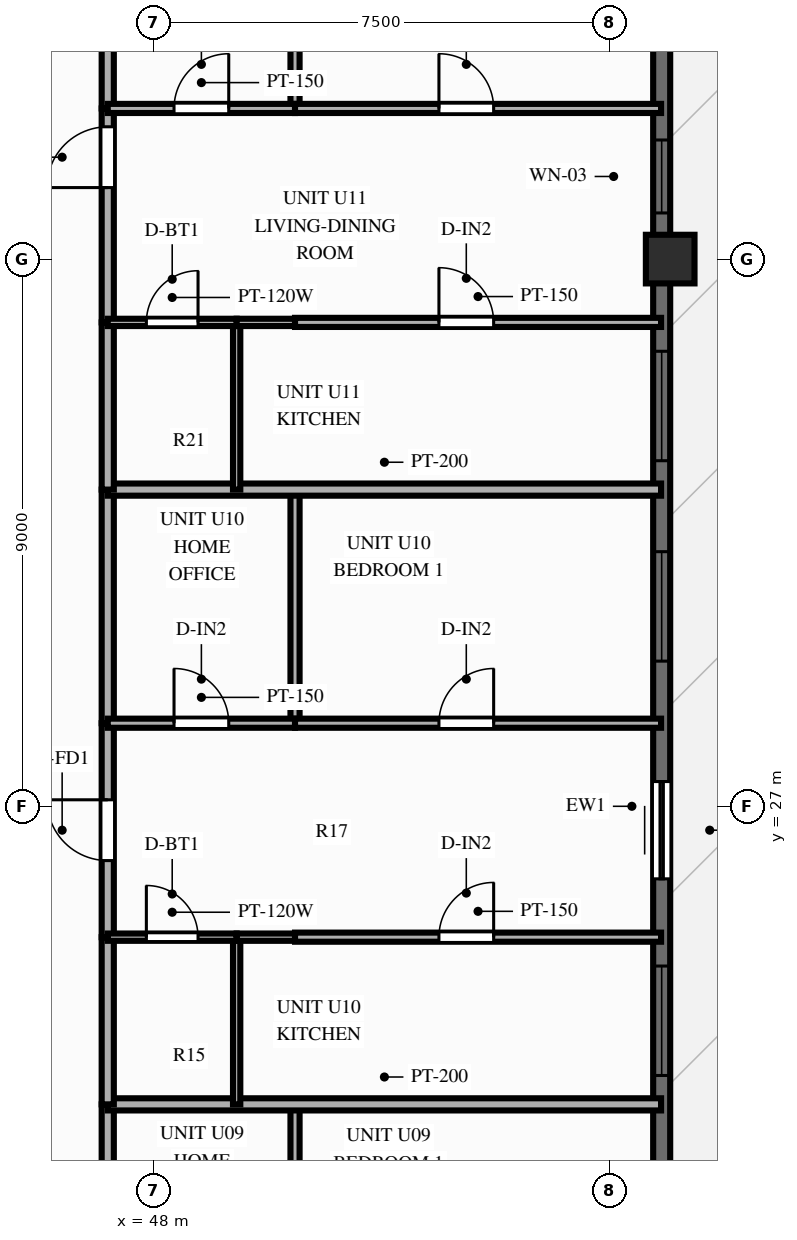
"""IFC4 building model, lengths in metres.
Left out: names, types, materials, properties, quantities, classifications, styles, units other than length and angle.
Written with IfcOpenShell. Run it as: python <this file> out.ifc"""

import sys

from ifc_helpers import new_model, si_unit, direction, frame, frame_2d, origin, origin_2d, place, context, subcontext, project, spatial, rectangle, extrude, source, transform, mapped, element, fill, save


model = new_model("IFC4")
c1 = context("Model", 3, precision=1e-05, world=origin(), true_north=direction((0.0, 1.0)))
c2 = subcontext(c1, "Body", "Model", "MODEL_VIEW")
j1 = project(units=[si_unit("LENGTHUNIT", "METRE"), si_unit("PLANEANGLEUNIT", "RADIAN")], contexts=[c1])
p1 = place(None, origin())
s1 = spatial("IfcSite", under=j1, at=p1, CompositionType="ELEMENT")
p2 = place(p1, origin())
s2 = spatial("IfcBuilding", under=s1, at=p2, CompositionType="ELEMENT")
p3 = place(p2, frame((0.0, 0.0, 202.6)))
s3 = spatial("IfcBuildingStorey", under=s2, at=p3, CompositionType="ELEMENT", Elevation=202.6)
m1 = source(origin(), c2, "Body", "SweptSolid", [
    extrude(rectangle(XDim=0.8, YDim=0.8, at=origin_2d()), origin(), (0.0, 0.0, 1.0), 3.9),
])
p4 = place(p3, frame((56.5, 36.0, 0.0), z_axis=(0.0, 0.0, 1.0), x_axis=(1.0, 0.0, 0.0)))
e1 = element("IfcColumn", 1, at=p4, inside=s3, PredefinedType="COLUMN", context=c2, shape_type="MappedRepresentation", body=[
    mapped(m1, transform((0.0, 0.0, 0.0), scale=1.0)),
])
p5 = place(p3, frame((56.36, 11.5, 0.0), z_axis=(0.0, 0.0, 1.0), x_axis=(0.0, 1.0, 0.0)))
e2 = element("IfcWall", 2, at=p5, inside=s3, PredefinedType="SOLIDWALL", context=c2, shape_type="SweptSolid", body=[
    extrude(rectangle(XDim=31.0, YDim=0.28, at=frame_2d((15.5, 0.0))), origin(), (0.0, 0.0, 1.0), 2.79),
])
p6 = place(p5, frame((0.685, 0.0, 0.85)))
e3 = element("IfcOpeningElement", 3, at=p6, cuts=e2, PredefinedType="OPENING", context=c2, shape_type="SweptSolid", body=[
    extrude(rectangle(XDim=1.8, YDim=1.65, at=frame_2d((0.9, 0.825))), frame((0.0, 0.152, 0.0), z_axis=(0.0, -1.0, 0.0), x_axis=(1.0, 0.0, 0.0)), (0.0, 0.0, 1.0), 0.304),
])
p7 = place(p5, frame((3.695, 0.0, 0.85)))
e4 = element("IfcOpeningElement", 4, at=p7, cuts=e2, PredefinedType="OPENING", context=c2, shape_type="SweptSolid", body=[
    extrude(rectangle(XDim=1.8, YDim=1.65, at=frame_2d((0.9, 0.825))), frame((0.0, 0.152, 0.0), z_axis=(0.0, -1.0, 0.0), x_axis=(1.0, 0.0, 0.0)), (0.0, 0.0, 1.0), 0.304),
])
p8 = place(p5, frame((7.789, 0.0, 0.85)))
e5 = element("IfcOpeningElement", 5, at=p8, cuts=e2, PredefinedType="OPENING", context=c2, shape_type="SweptSolid", body=[
    extrude(rectangle(XDim=1.8, YDim=1.65, at=frame_2d((0.9, 0.825))), frame((0.0, 0.152, 0.0), z_axis=(0.0, -1.0, 0.0), x_axis=(1.0, 0.0, 0.0)), (0.0, 0.0, 1.0), 0.304),
])
p9 = place(p5, frame((11.073, 0.0, 0.85)))
e6 = element("IfcOpeningElement", 6, at=p9, cuts=e2, PredefinedType="OPENING", context=c2, shape_type="SweptSolid", body=[
    extrude(rectangle(XDim=1.8, YDim=1.65, at=frame_2d((0.9, 0.825))), frame((0.0, 0.152, 0.0), z_axis=(0.0, -1.0, 0.0), x_axis=(1.0, 0.0, 0.0)), (0.0, 0.0, 1.0), 0.304),
])
p10 = place(p5, frame((15.907, 0.0, 0.0), z_axis=(0.0, 0.0, 1.0), x_axis=(-1.0, 0.0, 0.0)))
e7 = element("IfcOpeningElement", 7, at=p10, cuts=e2, PredefinedType="OPENING", context=c2, shape_type="SweptSolid", body=[
    extrude(rectangle(XDim=1.6, YDim=2.15, at=frame_2d((0.8, 1.075))), frame((0.0, 0.152, 0.0), z_axis=(0.0, -1.0, 0.0), x_axis=(1.0, 0.0, 0.0)), (0.0, 0.0, 1.0), 0.304),
])
p11 = place(p5, frame((17.888, 0.0, 0.85)))
e8 = element("IfcOpeningElement", 8, at=p11, cuts=e2, PredefinedType="OPENING", context=c2, shape_type="SweptSolid", body=[
    extrude(rectangle(XDim=1.8, YDim=1.65, at=frame_2d((0.9, 0.825))), frame((0.0, 0.152, 0.0), z_axis=(0.0, -1.0, 0.0), x_axis=(1.0, 0.0, 0.0)), (0.0, 0.0, 1.0), 0.304),
])
p12 = place(p5, frame((21.184, 0.0, 0.85)))
e9 = element("IfcOpeningElement", 9, at=p12, cuts=e2, PredefinedType="OPENING", context=c2, shape_type="SweptSolid", body=[
    extrude(rectangle(XDim=1.8, YDim=1.65, at=frame_2d((0.9, 0.825))), frame((0.0, 0.152, 0.0), z_axis=(0.0, -1.0, 0.0), x_axis=(1.0, 0.0, 0.0)), (0.0, 0.0, 1.0), 0.304),
])
p13 = place(p5, frame((25.259, 0.0, 0.85)))
e10 = element("IfcOpeningElement", 10, at=p13, cuts=e2, PredefinedType="OPENING", context=c2, shape_type="SweptSolid", body=[
    extrude(rectangle(XDim=1.2, YDim=1.5, at=frame_2d((0.6, 0.75))), frame((0.0, 0.152, 0.0), z_axis=(0.0, -1.0, 0.0), x_axis=(1.0, 0.0, 0.0)), (0.0, 0.0, 1.0), 0.304),
])
p14 = place(p5, frame((27.969, 0.0, 0.85)))
e11 = element("IfcOpeningElement", 11, at=p14, cuts=e2, PredefinedType="OPENING", context=c2, shape_type="SweptSolid", body=[
    extrude(rectangle(XDim=1.8, YDim=1.65, at=frame_2d((0.9, 0.825))), frame((0.0, 0.152, 0.0), z_axis=(0.0, -1.0, 0.0), x_axis=(1.0, 0.0, 0.0)), (0.0, 0.0, 1.0), 0.304),
])
p15 = place(p3, frame((47.25, 18.28, 0.0), z_axis=(0.0, 0.0, 1.0), x_axis=(0.0, 1.0, 0.0)))
e12 = element("IfcWall", 12, at=p15, inside=s3, PredefinedType="PARTITIONING", context=c2, shape_type="SweptSolid", body=[
    extrude(rectangle(XDim=3.818, YDim=0.2, at=frame_2d((1.909, 0.0))), origin(), (0.0, 0.0, 1.0), 3.6),
])
p16 = place(p3, frame((50.33, 18.28, 0.0), z_axis=(0.0, 0.0, 1.0), x_axis=(0.0, 1.0, 0.0)))
e13 = element("IfcWall", 13, at=p16, inside=s3, PredefinedType="PARTITIONING", context=c2, shape_type="SweptSolid", body=[
    extrude(rectangle(XDim=3.818, YDim=0.15, at=frame_2d((1.909, 0.0))), origin(), (0.0, 0.0, 1.0), 3.39),
])
p17 = place(p3, frame((47.25, 22.098, 0.0), z_axis=(0.0, 0.0, 1.0), x_axis=(1.0, 0.0, 0.0)))
e14 = element("IfcWall", 14, at=p17, inside=s3, PredefinedType="PARTITIONING", context=c2, shape_type="SweptSolid", body=[
    extrude(rectangle(XDim=9.1, YDim=0.2, at=frame_2d((4.55, 0.0))), origin(), (0.0, 0.0, 1.0), 3.29),
])
p18 = place(p3, frame((47.25, 22.098, 0.0), z_axis=(0.0, 0.0, 1.0), x_axis=(0.0, 1.0, 0.0)))
e15 = element("IfcWall", 15, at=p18, inside=s3, PredefinedType="PARTITIONING", context=c2, shape_type="SweptSolid", body=[
    extrude(rectangle(XDim=2.75, YDim=0.2, at=frame_2d((1.375, 0.0))), origin(), (0.0, 0.0, 1.0), 3.6),
])
p19 = place(p3, frame((47.25, 24.848, 0.0), z_axis=(0.0, 0.0, 1.0), x_axis=(0.0, 1.0, 0.0)))
e16 = element("IfcWall", 16, at=p19, inside=s3, PredefinedType="PARTITIONING", context=c2, shape_type="SweptSolid", body=[
    extrude(rectangle(XDim=3.519, YDim=0.2, at=frame_2d((1.759, 0.0))), origin(), (0.0, 0.0, 1.0), 3.6),
])
p20 = place(p19, frame((1.26, 0.0, 0.0)))
e17 = element("IfcOpeningElement", 17, at=p20, cuts=e16, PredefinedType="OPENING", context=c2, shape_type="SweptSolid", body=[
    extrude(rectangle(XDim=1.0, YDim=2.15, at=frame_2d((0.5, 1.075))), frame((0.0, 0.112, 0.0), z_axis=(0.0, -1.0, 0.0), x_axis=(1.0, 0.0, 0.0)), (0.0, 0.0, 1.0), 0.224),
])
p21 = place(p3, frame((47.25, 28.366, 0.0), z_axis=(0.0, 0.0, 1.0), x_axis=(0.0, 1.0, 0.0)))
e18 = element("IfcWall", 18, at=p21, inside=s3, PredefinedType="PARTITIONING", context=c2, shape_type="SweptSolid", body=[
    extrude(rectangle(XDim=3.842, YDim=0.2, at=frame_2d((1.921, 0.0))), origin(), (0.0, 0.0, 1.0), 3.6),
])
p22 = place(p3, frame((49.37, 22.098, 0.0), z_axis=(0.0, 0.0, 1.0), x_axis=(0.0, 1.0, 0.0)))
e19 = element("IfcWall", 19, at=p22, inside=s3, PredefinedType="PARTITIONING", context=c2, shape_type="SweptSolid", body=[
    extrude(rectangle(XDim=2.75, YDim=0.12, at=frame_2d((1.375, 0.0))), origin(), (0.0, 0.0, 1.0), 3.6),
])
p23 = place(p3, frame((50.33, 28.366, 0.0), z_axis=(0.0, 0.0, 1.0), x_axis=(0.0, 1.0, 0.0)))
e20 = element("IfcWall", 20, at=p23, inside=s3, PredefinedType="PARTITIONING", context=c2, shape_type="SweptSolid", body=[
    extrude(rectangle(XDim=3.842, YDim=0.15, at=frame_2d((1.921, 0.0))), origin(), (0.0, 0.0, 1.0), 3.39),
])
p24 = place(p3, frame((47.25, 24.848, 0.0), z_axis=(0.0, 0.0, 1.0), x_axis=(1.0, 0.0, 0.0)))
e21 = element("IfcWall", 21, at=p24, inside=s3, PredefinedType="PARTITIONING", context=c2, shape_type="SweptSolid", body=[
    extrude(rectangle(XDim=2.12, YDim=0.12, at=frame_2d((1.06, 0.0))), origin(), (0.0, 0.0, 1.0), 3.6),
])
p25 = place(p24, frame((0.635, 0.0, 0.0)))
e22 = element("IfcOpeningElement", 22, at=p25, cuts=e21, PredefinedType="OPENING", context=c2, shape_type="SweptSolid", body=[
    extrude(rectangle(XDim=0.85, YDim=2.05, at=frame_2d((0.425, 1.025))), frame((0.0, 0.072, 0.0), z_axis=(0.0, -1.0, 0.0), x_axis=(1.0, 0.0, 0.0)), (0.0, 0.0, 1.0), 0.144),
])
p26 = place(p3, frame((49.37, 24.848, 0.0), z_axis=(0.0, 0.0, 1.0), x_axis=(1.0, 0.0, 0.0)))
e23 = element("IfcWall", 23, at=p26, inside=s3, PredefinedType="PARTITIONING", context=c2, shape_type="SweptSolid", body=[
    extrude(rectangle(XDim=0.96, YDim=0.12, at=frame_2d((0.48, 0.0))), origin(), (0.0, 0.0, 1.0), 3.6),
])
p27 = place(p3, frame((50.33, 24.848, 0.0), z_axis=(0.0, 0.0, 1.0), x_axis=(1.0, 0.0, 0.0)))
e24 = element("IfcWall", 24, at=p27, inside=s3, PredefinedType="PARTITIONING", context=c2, shape_type="SweptSolid", body=[
    extrude(rectangle(XDim=6.02, YDim=0.15, at=frame_2d((3.01, 0.0))), origin(), (0.0, 0.0, 1.0), 3.6),
])
p28 = place(p27, frame((2.367, 0.0, 0.0)))
e25 = element("IfcOpeningElement", 25, at=p28, cuts=e24, PredefinedType="OPENING", context=c2, shape_type="SweptSolid", body=[
    extrude(rectangle(XDim=0.9, YDim=2.1, at=frame_2d((0.45, 1.05))), frame((0.0, 0.087, 0.0), z_axis=(0.0, -1.0, 0.0), x_axis=(1.0, 0.0, 0.0)), (0.0, 0.0, 1.0), 0.174),
])
p29 = place(p3, frame((47.25, 28.366, 0.0), z_axis=(0.0, 0.0, 1.0), x_axis=(1.0, 0.0, 0.0)))
e26 = element("IfcWall", 26, at=p29, inside=s3, PredefinedType="PARTITIONING", context=c2, shape_type="SweptSolid", body=[
    extrude(rectangle(XDim=3.08, YDim=0.15, at=frame_2d((1.54, 0.0))), origin(), (0.0, 0.0, 1.0), 3.6),
])
p30 = place(p29, frame((1.09, 0.0, 0.0)))
e27 = element("IfcOpeningElement", 27, at=p30, cuts=e26, PredefinedType="OPENING", context=c2, shape_type="SweptSolid", body=[
    extrude(rectangle(XDim=0.9, YDim=2.1, at=frame_2d((0.45, 1.05))), frame((0.0, 0.087, 0.0), z_axis=(0.0, -1.0, 0.0), x_axis=(1.0, 0.0, 0.0)), (0.0, 0.0, 1.0), 0.174),
])
p31 = place(p3, frame((50.33, 28.366, 0.0), z_axis=(0.0, 0.0, 1.0), x_axis=(1.0, 0.0, 0.0)))
e28 = element("IfcWall", 28, at=p31, inside=s3, PredefinedType="PARTITIONING", context=c2, shape_type="SweptSolid", body=[
    extrude(rectangle(XDim=6.02, YDim=0.15, at=frame_2d((3.01, 0.0))), origin(), (0.0, 0.0, 1.0), 3.6),
])
p32 = place(p31, frame((2.367, 0.0, 0.0)))
e29 = element("IfcOpeningElement", 29, at=p32, cuts=e28, PredefinedType="OPENING", context=c2, shape_type="SweptSolid", body=[
    extrude(rectangle(XDim=0.9, YDim=2.1, at=frame_2d((0.45, 1.05))), frame((0.0, 0.087, 0.0), z_axis=(0.0, -1.0, 0.0), x_axis=(1.0, 0.0, 0.0)), (0.0, 0.0, 1.0), 0.174),
])
p33 = place(p3, frame((47.25, 32.209, 0.0), z_axis=(0.0, 0.0, 1.0), x_axis=(1.0, 0.0, 0.0)))
e30 = element("IfcWall", 30, at=p33, inside=s3, PredefinedType="PARTITIONING", context=c2, shape_type="SweptSolid", body=[
    extrude(rectangle(XDim=9.1, YDim=0.2, at=frame_2d((4.55, 0.0))), origin(), (0.0, 0.0, 1.0), 3.29),
])
p34 = place(p3, frame((47.25, 32.209, 0.0), z_axis=(0.0, 0.0, 1.0), x_axis=(0.0, 1.0, 0.0)))
e31 = element("IfcWall", 31, at=p34, inside=s3, PredefinedType="PARTITIONING", context=c2, shape_type="SweptSolid", body=[
    extrude(rectangle(XDim=2.75, YDim=0.2, at=frame_2d((1.375, 0.0))), origin(), (0.0, 0.0, 1.0), 3.6),
])
p35 = place(p3, frame((47.25, 34.959, 0.0), z_axis=(0.0, 0.0, 1.0), x_axis=(0.0, 1.0, 0.0)))
e32 = element("IfcWall", 32, at=p35, inside=s3, PredefinedType="PARTITIONING", context=c2, shape_type="SweptSolid", body=[
    extrude(rectangle(XDim=3.519, YDim=0.2, at=frame_2d((1.76, 0.0))), origin(), (0.0, 0.0, 1.0), 3.6),
])
p36 = place(p35, frame((2.217, 0.0, 0.0)))
e33 = element("IfcOpeningElement", 33, at=p36, cuts=e32, PredefinedType="OPENING", context=c2, shape_type="SweptSolid", body=[
    extrude(rectangle(XDim=1.0, YDim=2.15, at=frame_2d((0.5, 1.075))), frame((0.0, 0.112, 0.0), z_axis=(0.0, -1.0, 0.0), x_axis=(1.0, 0.0, 0.0)), (0.0, 0.0, 1.0), 0.224),
])
p37 = place(p3, frame((47.25, 38.478, 0.0), z_axis=(0.0, 0.0, 1.0), x_axis=(0.0, 1.0, 0.0)))
e34 = element("IfcWall", 34, at=p37, inside=s3, PredefinedType="PARTITIONING", context=c2, shape_type="SweptSolid", body=[
    extrude(rectangle(XDim=3.842, YDim=0.2, at=frame_2d((1.921, 0.0))), origin(), (0.0, 0.0, 1.0), 3.6),
])
p38 = place(p3, frame((49.37, 32.209, 0.0), z_axis=(0.0, 0.0, 1.0), x_axis=(0.0, 1.0, 0.0)))
e35 = element("IfcWall", 35, at=p38, inside=s3, PredefinedType="PARTITIONING", context=c2, shape_type="SweptSolid", body=[
    extrude(rectangle(XDim=2.75, YDim=0.12, at=frame_2d((1.375, 0.0))), origin(), (0.0, 0.0, 1.0), 3.6),
])
p39 = place(p3, frame((50.33, 38.478, 0.0), z_axis=(0.0, 0.0, 1.0), x_axis=(0.0, 1.0, 0.0)))
e36 = element("IfcWall", 36, at=p39, inside=s3, PredefinedType="PARTITIONING", context=c2, shape_type="SweptSolid", body=[
    extrude(rectangle(XDim=3.842, YDim=0.15, at=frame_2d((1.921, 0.0))), origin(), (0.0, 0.0, 1.0), 3.6),
])
p40 = place(p3, frame((47.25, 34.959, 0.0), z_axis=(0.0, 0.0, 1.0), x_axis=(1.0, 0.0, 0.0)))
e37 = element("IfcWall", 37, at=p40, inside=s3, PredefinedType="PARTITIONING", context=c2, shape_type="SweptSolid", body=[
    extrude(rectangle(XDim=2.12, YDim=0.12, at=frame_2d((1.06, 0.0))), origin(), (0.0, 0.0, 1.0), 3.6),
])
p41 = place(p40, frame((0.635, 0.0, 0.0)))
e38 = element("IfcOpeningElement", 38, at=p41, cuts=e37, PredefinedType="OPENING", context=c2, shape_type="SweptSolid", body=[
    extrude(rectangle(XDim=0.85, YDim=2.05, at=frame_2d((0.425, 1.025))), frame((0.0, 0.072, 0.0), z_axis=(0.0, -1.0, 0.0), x_axis=(1.0, 0.0, 0.0)), (0.0, 0.0, 1.0), 0.144),
])
p42 = place(p3, frame((49.37, 34.959, 0.0), z_axis=(0.0, 0.0, 1.0), x_axis=(1.0, 0.0, 0.0)))
e39 = element("IfcWall", 39, at=p42, inside=s3, PredefinedType="PARTITIONING", context=c2, shape_type="SweptSolid", body=[
    extrude(rectangle(XDim=0.96, YDim=0.12, at=frame_2d((0.48, 0.0))), origin(), (0.0, 0.0, 1.0), 3.6),
])
p43 = place(p3, frame((50.33, 34.959, 0.0), z_axis=(0.0, 0.0, 1.0), x_axis=(1.0, 0.0, 0.0)))
e40 = element("IfcWall", 40, at=p43, inside=s3, PredefinedType="PARTITIONING", context=c2, shape_type="SweptSolid", body=[
    extrude(rectangle(XDim=6.02, YDim=0.15, at=frame_2d((3.01, 0.0))), origin(), (0.0, 0.0, 1.0), 3.6),
])
p44 = place(p43, frame((2.367, 0.0, 0.0)))
e41 = element("IfcOpeningElement", 41, at=p44, cuts=e40, PredefinedType="OPENING", context=c2, shape_type="SweptSolid", body=[
    extrude(rectangle(XDim=0.9, YDim=2.1, at=frame_2d((0.45, 1.05))), frame((0.0, 0.087, 0.0), z_axis=(0.0, -1.0, 0.0), x_axis=(1.0, 0.0, 0.0)), (0.0, 0.0, 1.0), 0.174),
])
p45 = place(p3, frame((47.25, 38.478, 0.0), z_axis=(0.0, 0.0, 1.0), x_axis=(1.0, 0.0, 0.0)))
e42 = element("IfcWall", 42, at=p45, inside=s3, PredefinedType="PARTITIONING", context=c2, shape_type="SweptSolid", body=[
    extrude(rectangle(XDim=3.08, YDim=0.15, at=frame_2d((1.54, 0.0))), origin(), (0.0, 0.0, 1.0), 3.6),
])
p46 = place(p45, frame((1.09, 0.0, 0.0)))
e43 = element("IfcOpeningElement", 43, at=p46, cuts=e42, PredefinedType="OPENING", context=c2, shape_type="SweptSolid", body=[
    extrude(rectangle(XDim=0.9, YDim=2.1, at=frame_2d((0.45, 1.05))), frame((0.0, 0.087, 0.0), z_axis=(0.0, -1.0, 0.0), x_axis=(1.0, 0.0, 0.0)), (0.0, 0.0, 1.0), 0.174),
])
p47 = place(p3, frame((50.33, 38.478, 0.0), z_axis=(0.0, 0.0, 1.0), x_axis=(1.0, 0.0, 0.0)))
e44 = element("IfcWall", 44, at=p47, inside=s3, PredefinedType="PARTITIONING", context=c2, shape_type="SweptSolid", body=[
    extrude(rectangle(XDim=6.02, YDim=0.15, at=frame_2d((3.01, 0.0))), origin(), (0.0, 0.0, 1.0), 3.6),
])
p48 = place(p47, frame((2.367, 0.0, 0.0)))
e45 = element("IfcOpeningElement", 45, at=p48, cuts=e44, PredefinedType="OPENING", context=c2, shape_type="SweptSolid", body=[
    extrude(rectangle(XDim=0.9, YDim=2.1, at=frame_2d((0.45, 1.05))), frame((0.0, 0.087, 0.0), z_axis=(0.0, -1.0, 0.0), x_axis=(1.0, 0.0, 0.0)), (0.0, 0.0, 1.0), 0.174),
])
m2 = source(origin(), c2, "Body", "SweptSolid", [
    extrude(rectangle(XDim=1.8, YDim=1.65, at=frame_2d((0.9, 0.825))), frame((0.0, 0.03, 0.0), z_axis=(0.0, -1.0, 0.0), x_axis=(1.0, 0.0, 0.0)), (0.0, 0.0, 1.0), 0.06),
])
p49 = place(p9, origin())
e46 = element("IfcWindow", 46, at=p49, inside=s3, PartitioningType="SINGLE_PANEL", PredefinedType="WINDOW", context=c2, shape_type="MappedRepresentation", body=[
    mapped(m2, transform((0.0, 0.0, 0.0), scale=1.0)),
])
fill(e6, e46)
m3 = source(origin(), c2, "Body", "SweptSolid", [
    extrude(rectangle(XDim=1.6, YDim=2.15, at=frame_2d((0.8, 1.075))), frame((0.0, 0.025, 0.0), z_axis=(0.0, -1.0, 0.0), x_axis=(1.0, 0.0, 0.0)), (0.0, 0.0, 1.0), 0.05),
])
p50 = place(p10, origin())
e47 = element("IfcDoor", 47, at=p50, inside=s3, OperationType="SLIDING_TO_LEFT", PredefinedType="DOOR", context=c2, shape_type="MappedRepresentation", body=[
    mapped(m3, transform((0.0, 0.0, 0.0), scale=1.0)),
])
fill(e7, e47)
p51 = place(p11, origin())
e48 = element("IfcWindow", 48, at=p51, inside=s3, PartitioningType="SINGLE_PANEL", PredefinedType="WINDOW", context=c2, shape_type="MappedRepresentation", body=[
    mapped(m2, transform((0.0, 0.0, 0.0), scale=1.0)),
])
fill(e8, e48)
p52 = place(p12, origin())
e49 = element("IfcWindow", 49, at=p52, inside=s3, PartitioningType="SINGLE_PANEL", PredefinedType="WINDOW", context=c2, shape_type="MappedRepresentation", body=[
    mapped(m2, transform((0.0, 0.0, 0.0), scale=1.0)),
])
fill(e9, e49)
m4 = source(origin(), c2, "Body", "SweptSolid", [
    extrude(rectangle(XDim=1.2, YDim=1.5, at=frame_2d((0.6, 0.75))), frame((0.0, 0.03, 0.0), z_axis=(0.0, -1.0, 0.0), x_axis=(1.0, 0.0, 0.0)), (0.0, 0.0, 1.0), 0.06),
])
p53 = place(p13, origin())
e50 = element("IfcWindow", 50, at=p53, inside=s3, PartitioningType="SINGLE_PANEL", PredefinedType="WINDOW", context=c2, shape_type="MappedRepresentation", body=[
    mapped(m4, transform((0.0, 0.0, 0.0), scale=1.0)),
])
fill(e10, e50)
m5 = source(origin(), c2, "Body", "SweptSolid", [
    extrude(rectangle(XDim=1.0, YDim=2.15, at=frame_2d((0.5, 1.075))), frame((0.0, 0.025, 0.0), z_axis=(0.0, -1.0, 0.0), x_axis=(1.0, 0.0, 0.0)), (0.0, 0.0, 1.0), 0.05),
])
p54 = place(p20, origin())
e51 = element("IfcDoor", 51, at=p54, inside=s3, OperationType="SINGLE_SWING_RIGHT", PredefinedType="DOOR", context=c2, shape_type="MappedRepresentation", body=[
    mapped(m5, transform((0.0, 0.0, 0.0), scale=1.0)),
])
fill(e17, e51)
m6 = source(origin(), c2, "Body", "SweptSolid", [
    extrude(rectangle(XDim=0.85, YDim=2.05, at=frame_2d((0.425, 1.025))), frame((0.0, 0.025, 0.0), z_axis=(0.0, -1.0, 0.0), x_axis=(1.0, 0.0, 0.0)), (0.0, 0.0, 1.0), 0.05),
])
p55 = place(p25, origin())
e52 = element("IfcDoor", 52, at=p55, inside=s3, OperationType="SINGLE_SWING_LEFT", PredefinedType="DOOR", context=c2, shape_type="MappedRepresentation", body=[
    mapped(m6, transform((0.0, 0.0, 0.0), scale=1.0)),
])
fill(e22, e52)
m7 = source(origin(), c2, "Body", "SweptSolid", [
    extrude(rectangle(XDim=0.9, YDim=2.1, at=frame_2d((0.45, 1.05))), frame((0.0, 0.025, 0.0), z_axis=(0.0, -1.0, 0.0), x_axis=(1.0, 0.0, 0.0)), (0.0, 0.0, 1.0), 0.05),
])
p56 = place(p28, origin())
e53 = element("IfcDoor", 53, at=p56, inside=s3, OperationType="SINGLE_SWING_RIGHT", PredefinedType="DOOR", context=c2, shape_type="MappedRepresentation", body=[
    mapped(m7, transform((0.0, 0.0, 0.0), scale=1.0)),
])
fill(e25, e53)
p57 = place(p30, origin())
e54 = element("IfcDoor", 54, at=p57, inside=s3, OperationType="SINGLE_SWING_LEFT", PredefinedType="DOOR", context=c2, shape_type="MappedRepresentation", body=[
    mapped(m7, transform((0.0, 0.0, 0.0), scale=1.0)),
])
fill(e27, e54)
p58 = place(p32, origin())
e55 = element("IfcDoor", 55, at=p58, inside=s3, OperationType="SINGLE_SWING_RIGHT", PredefinedType="DOOR", context=c2, shape_type="MappedRepresentation", body=[
    mapped(m7, transform((0.0, 0.0, 0.0), scale=1.0)),
])
fill(e29, e55)
p59 = place(p36, origin())
e56 = element("IfcDoor", 56, at=p59, inside=s3, OperationType="SINGLE_SWING_LEFT", PredefinedType="DOOR", context=c2, shape_type="MappedRepresentation", body=[
    mapped(m5, transform((0.0, 0.0, 0.0), scale=1.0)),
])
fill(e33, e56)
p60 = place(p41, origin())
e57 = element("IfcDoor", 57, at=p60, inside=s3, OperationType="SINGLE_SWING_RIGHT", PredefinedType="DOOR", context=c2, shape_type="MappedRepresentation", body=[
    mapped(m6, transform((0.0, 0.0, 0.0), scale=1.0)),
])
fill(e38, e57)
p61 = place(p44, origin())
e58 = element("IfcDoor", 58, at=p61, inside=s3, OperationType="SINGLE_SWING_LEFT", PredefinedType="DOOR", context=c2, shape_type="MappedRepresentation", body=[
    mapped(m7, transform((0.0, 0.0, 0.0), scale=1.0)),
])
fill(e41, e58)
p62 = place(p46, origin())
e59 = element("IfcDoor", 59, at=p62, inside=s3, OperationType="SINGLE_SWING_RIGHT", PredefinedType="DOOR", context=c2, shape_type="MappedRepresentation", body=[
    mapped(m7, transform((0.0, 0.0, 0.0), scale=1.0)),
])
fill(e43, e59)
p63 = place(p48, origin())
e60 = element("IfcDoor", 60, at=p63, inside=s3, OperationType="SINGLE_SWING_LEFT", PredefinedType="DOOR", context=c2, shape_type="MappedRepresentation", body=[
    mapped(m7, transform((0.0, 0.0, 0.0), scale=1.0)),
])
fill(e45, e60)
save(model, sys.argv[1])
